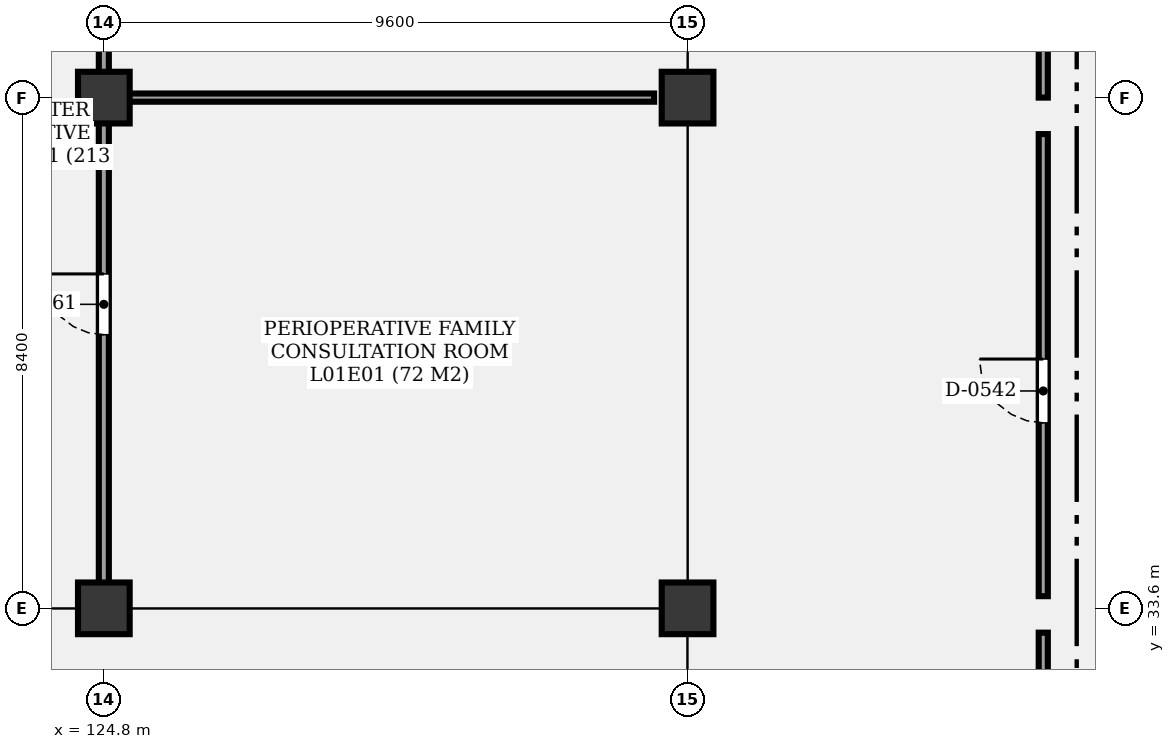
"""IFC4 building model, lengths in metres.
Left out: names, types, materials, properties, quantities, classifications, styles, units other than length and angle.
Written with IfcOpenShell. Run it as: python <this file> out.ifc"""

import sys

from ifc_helpers import new_model, si_unit, direction, frame, frame_2d, origin, origin_2d, place, context, subcontext, project, spatial, rectangle, extrude, element, fill, save


model = new_model("IFC4")
c1 = context("Model", 3, precision=1e-05, world=origin(), true_north=direction((0.0, 1.0)))
c2 = subcontext(c1, "Body", "Model", "MODEL_VIEW")
j1 = project(units=[si_unit("LENGTHUNIT", "METRE"), si_unit("PLANEANGLEUNIT", "RADIAN")], contexts=[c1])
p1 = place(None, origin())
s1 = spatial("IfcSite", under=j1, at=p1, CompositionType="ELEMENT")
p2 = place(p1, origin())
s2 = spatial("IfcBuilding", under=s1, at=p2, CompositionType="ELEMENT")
p3 = place(p2, frame((0.0, 0.0, 5.1)))
s3 = spatial("IfcBuildingStorey", under=s2, at=p3, CompositionType="ELEMENT", Elevation=5.1)
for number, where, z_axis, x_axis in (
    (1, (124.8, 33.6, 0.0), (0.0, 0.0, 1.0), (1.0, 0.0, 0.0)),
    (2, (124.8, 42.0, 0.0), (0.0, 0.0, 1.0), (1.0, 0.0, 0.0)),
    (3, (134.4, 33.6, 0.0), (0.0, 0.0, 1.0), (1.0, 0.0, 0.0)),
    (4, (134.4, 42.0, 0.0), (0.0, 0.0, 1.0), (1.0, 0.0, 0.0)),
):
    element("IfcColumn", number, at=place(p3, frame(where, z_axis=z_axis, x_axis=x_axis)), inside=s3, PredefinedType="COLUMN", context=c2, shape_type="SweptSolid", body=[
        extrude(rectangle(XDim=0.85, YDim=0.85, at=origin_2d()), origin(), (0.0, 0.0, 1.0), 4.8),
    ])
p4 = place(p3, frame((124.8, 33.85, 0.0), z_axis=(0.0, 0.0, 1.0), x_axis=(0.0, 1.0, 0.0)))
e5 = element("IfcWall", 5, at=p4, inside=s3, PredefinedType="PARTITIONING", context=c2, shape_type="SweptSolid", body=[
    extrude(rectangle(XDim=7.9, YDim=0.165, at=frame_2d((3.95, 0.0))), origin(), (0.0, 0.0, 1.0), 3.68),
])
p5 = place(p4, frame((4.25, 0.0, 0.0)))
e6 = element("IfcOpeningElement", 6, at=p5, cuts=e5, PredefinedType="OPENING", context=c2, shape_type="SweptSolid", body=[
    extrude(rectangle(XDim=1.0, YDim=2.2, at=frame_2d((0.5, 1.1))), frame((0.0, 0.093, 0.0), z_axis=(0.0, -1.0, 0.0), x_axis=(1.0, 0.0, 0.0)), (0.0, 0.0, 1.0), 0.185),
])
p6 = place(p3, frame((124.8, 42.25, 0.0), z_axis=(0.0, 0.0, 1.0), x_axis=(0.0, 1.0, 0.0)))
e7 = element("IfcWall", 7, at=p6, inside=s3, PredefinedType="PARTITIONING", context=c2, shape_type="SweptSolid", body=[
    extrude(rectangle(XDim=7.9, YDim=0.165, at=frame_2d((3.95, 0.0))), origin(), (0.0, 0.0, 1.0), 3.68),
])
p7 = place(p6, frame((4.25, 0.0, 0.0)))
e8 = element("IfcOpeningElement", 8, at=p7, cuts=e7, PredefinedType="OPENING", context=c2, shape_type="SweptSolid", body=[
    extrude(rectangle(XDim=0.9, YDim=2.1, at=frame_2d((0.45, 1.05))), frame((0.0, 0.093, 0.0), z_axis=(0.0, -1.0, 0.0), x_axis=(1.0, 0.0, 0.0)), (0.0, 0.0, 1.0), 0.185),
])
p8 = place(p3, frame((124.95, 42.0, 0.0), z_axis=(0.0, 0.0, 1.0), x_axis=(1.0, 0.0, 0.0)))
e9 = element("IfcWall", 9, at=p8, inside=s3, PredefinedType="PARTITIONING", context=c2, shape_type="SweptSolid", body=[
    extrude(rectangle(XDim=8.9, YDim=0.135, at=frame_2d((4.45, 0.0))), origin(), (0.0, 0.0, 1.0), 3.68),
])
p9 = place(p3, frame((140.25, 25.6, 0.0), z_axis=(0.0, 0.0, 1.0), x_axis=(0.0, 1.0, 0.0)))
e10 = element("IfcWall", 10, at=p9, inside=s3, PredefinedType="PARTITIONING", context=c2, shape_type="SweptSolid", body=[
    extrude(rectangle(XDim=7.6, YDim=0.15, at=frame_2d((3.8, 0.0))), origin(), (0.0, 0.0, 1.0), 3.68),
])
p10 = place(p9, frame((3.2, 0.0, 0.0)))
e11 = element("IfcOpeningElement", 11, at=p10, cuts=e10, PredefinedType="OPENING", context=c2, shape_type="SweptSolid", body=[
    extrude(rectangle(XDim=1.05, YDim=2.1, at=frame_2d((0.525, 1.05))), frame((0.0, 0.085, 0.0), z_axis=(0.0, -1.0, 0.0), x_axis=(1.0, 0.0, 0.0)), (0.0, 0.0, 1.0), 0.17),
])
p11 = place(p3, frame((140.25, 33.8, 0.0), z_axis=(0.0, 0.0, 1.0), x_axis=(0.0, 1.0, 0.0)))
e12 = element("IfcWall", 12, at=p11, inside=s3, PredefinedType="PARTITIONING", context=c2, shape_type="SweptSolid", body=[
    extrude(rectangle(XDim=7.6, YDim=0.15, at=frame_2d((3.8, 0.0))), origin(), (0.0, 0.0, 1.0), 3.68),
])
p12 = place(p11, frame((2.85, 0.0, 0.0)))
e13 = element("IfcOpeningElement", 13, at=p12, cuts=e12, PredefinedType="OPENING", context=c2, shape_type="SweptSolid", body=[
    extrude(rectangle(XDim=1.05, YDim=2.1, at=frame_2d((0.525, 1.05))), frame((0.0, 0.085, 0.0), z_axis=(0.0, -1.0, 0.0), x_axis=(1.0, 0.0, 0.0)), (0.0, 0.0, 1.0), 0.17),
])
p13 = place(p3, frame((140.25, 42.0, 0.0), z_axis=(0.0, 0.0, 1.0), x_axis=(0.0, 1.0, 0.0)))
e14 = element("IfcWall", 14, at=p13, inside=s3, PredefinedType="PARTITIONING", context=c2, shape_type="SweptSolid", body=[
    extrude(rectangle(XDim=7.6, YDim=0.15, at=frame_2d((3.8, 0.0))), origin(), (0.0, 0.0, 1.0), 3.68),
])
p14 = place(p13, frame((2.85, 0.0, 0.0)))
e15 = element("IfcOpeningElement", 15, at=p14, cuts=e14, PredefinedType="OPENING", context=c2, shape_type="SweptSolid", body=[
    extrude(rectangle(XDim=1.05, YDim=2.1, at=frame_2d((0.525, 1.05))), frame((0.0, 0.085, 0.0), z_axis=(0.0, -1.0, 0.0), x_axis=(1.0, 0.0, 0.0)), (0.0, 0.0, 1.0), 0.17),
])
p15 = place(p5, origin())
e16 = element("IfcDoor", 16, at=p15, inside=s3, OperationType="SINGLE_SWING_RIGHT", PredefinedType="DOOR", context=c2, shape_type="SweptSolid", body=[
    extrude(rectangle(XDim=1.0, YDim=2.2, at=frame_2d((0.5, 1.1))), frame((0.0, 0.025, 0.0), z_axis=(0.0, -1.0, 0.0), x_axis=(1.0, 0.0, 0.0)), (0.0, 0.0, 1.0), 0.05),
])
fill(e6, e16)
p16 = place(p12, origin())
e17 = element("IfcDoor", 17, at=p16, inside=s3, OperationType="SINGLE_SWING_RIGHT", PredefinedType="DOOR", context=c2, shape_type="SweptSolid", body=[
    extrude(rectangle(XDim=1.05, YDim=2.1, at=frame_2d((0.525, 1.05))), frame((0.0, 0.025, 0.0), z_axis=(0.0, -1.0, 0.0), x_axis=(1.0, 0.0, 0.0)), (0.0, 0.0, 1.0), 0.05),
])
fill(e13, e17)
save(model, sys.argv[1])
